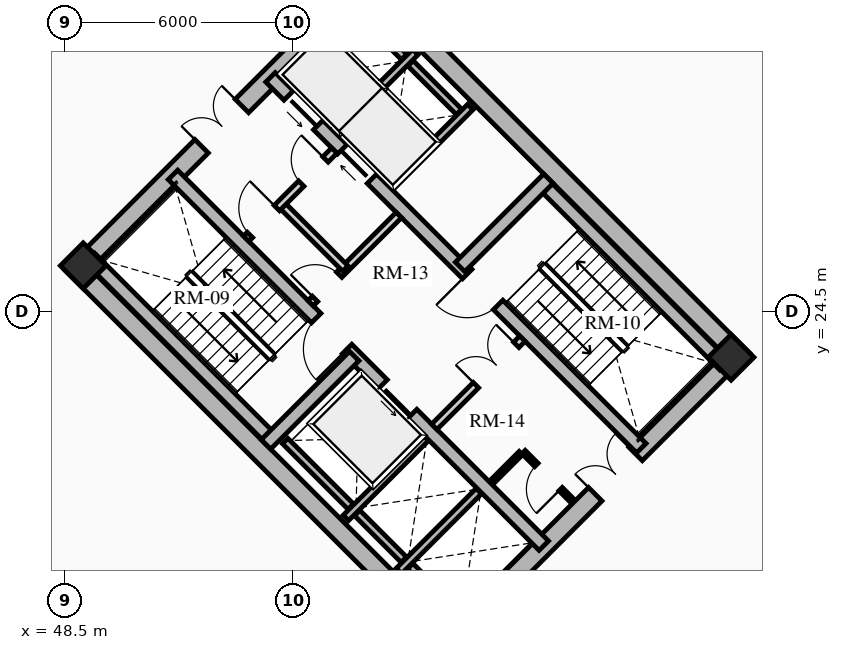
"""IFC4 building model, lengths in metres.
Left out: names, types, materials, properties, quantities, classifications, styles, units other than length and angle.
Written with IfcOpenShell. Run it as: python <this file> out.ifc"""

import sys

from ifc_helpers import new_model, si_unit, direction, frame, frame_2d, origin, origin_2d, place, context, subcontext, project, spatial, rectangle, extrude, source, transform, mapped, element, fill, save


model = new_model("IFC4")
c1 = context("Model", 3, precision=1e-05, world=origin(), true_north=direction((0.0, 1.0)))
c2 = subcontext(c1, "Body", "Model", "MODEL_VIEW")
j1 = project(units=[si_unit("LENGTHUNIT", "METRE"), si_unit("PLANEANGLEUNIT", "RADIAN")], contexts=[c1])
p1 = place(None, origin())
s1 = spatial("IfcSite", under=j1, at=p1, CompositionType="ELEMENT")
p2 = place(p1, origin())
s2 = spatial("IfcBuilding", under=s1, at=p2, CompositionType="ELEMENT")
p3 = place(p2, frame((0.0, 0.0, 4.8)))
s3 = spatial("IfcBuildingStorey", under=s2, at=p3, CompositionType="ELEMENT", Elevation=4.8)
for number, where, z_axis, x_axis in (
    (1, (58.773, 15.661, 0.0), (0.0, 0.0, 1.0), (-0.707, 0.707, 0.0)),
    (2, (66.339, 23.227, 0.0), (0.0, 0.0, 1.0), (-0.707, 0.707, 0.0)),
):
    element("IfcWall", number, at=place(p3, frame(where, z_axis=z_axis, x_axis=x_axis)), inside=s3, PredefinedType="SHEAR", context=c2, shape_type="SweptSolid", body=[
        extrude(rectangle(XDim=14.3, YDim=0.5, at=frame_2d((7.15, 0.0))), origin(), (0.0, 0.0, 1.0), 4.2),
    ])
p4 = place(p3, frame((58.596, 15.838, 0.0), z_axis=(0.0, 0.0, 1.0), x_axis=(0.707106781187, 0.707106781187, 0.0)))
e3 = element("IfcWall", 3, at=p4, inside=s3, PredefinedType="SHEAR", context=c2, shape_type="SweptSolid", body=[
    extrude(rectangle(XDim=10.7, YDim=0.5, at=frame_2d((5.35, 0.0))), origin(), (0.0, 0.0, 1.0), 4.2),
])
m1 = source(origin(), c2, "Body", "SweptSolid", [
    extrude(rectangle(XDim=1.5, YDim=2.02, at=frame_2d((0.75, 1.01))), frame((0.0, 0.26, 0.0), z_axis=(0.0, -1.0, 0.0), x_axis=(1.0, 0.0, 0.0)), (0.0, 0.0, 1.0), 0.52),
])
p5 = place(p4, frame((5.45, 0.0, 0.0)))
e4 = element("IfcOpeningElement", 4, at=p5, cuts=e3, PredefinedType="OPENING", context=c2, shape_type="MappedRepresentation", body=[
    mapped(m1, transform((0.0, 0.0, 0.0), x_axis=(1.0, 0.0, 0.0), y_axis=(0.0, 1.0, 0.0), z_axis=(0.0, 0.0, 1.0), scale=1.0)),
])
p6 = place(p3, frame((48.838, 25.596, 0.0), z_axis=(0.0, 0.0, 1.0), x_axis=(0.707106781187, 0.707106781187, 0.0)))
e5 = element("IfcWall", 5, at=p6, inside=s3, PredefinedType="SHEAR", context=c2, shape_type="SweptSolid", body=[
    extrude(rectangle(XDim=10.7, YDim=0.5, at=frame_2d((5.35, 0.0))), origin(), (0.0, 0.0, 1.0), 4.2),
])
p7 = place(p6, frame((4.6, 0.0, 0.0)))
e6 = element("IfcOpeningElement", 6, at=p7, cuts=e5, PredefinedType="OPENING", context=c2, shape_type="MappedRepresentation", body=[
    mapped(m1, transform((0.0, 0.0, 0.0), x_axis=(1.0, 0.0, 0.0), y_axis=(0.0, 1.0, 0.0), z_axis=(0.0, 0.0, 1.0), scale=1.0)),
])
p8 = place(p3, frame((61.096, 18.338, 0.0), z_axis=(0.0, 0.0, 1.0), x_axis=(-0.707106781187, 0.707106781187, 0.0)))
e7 = element("IfcWall", 7, at=p8, inside=s3, PredefinedType="SHEAR", context=c2, shape_type="SweptSolid", body=[
    extrude(rectangle(XDim=13.8, YDim=0.35, at=frame_2d((6.9, 0.0))), origin(), (0.0, 0.0, 1.0), 4.2),
])
m2 = source(origin(), c2, "Body", "SweptSolid", [
    extrude(rectangle(XDim=1.1, YDim=2.015, at=frame_2d((0.55, 1.007))), frame((0.0, 0.185, 0.0), z_axis=(0.0, -1.0, 0.0), x_axis=(1.0, 0.0, 0.0)), (0.0, 0.0, 1.0), 0.37),
])
p9 = place(p8, frame((4.9, 0.0, 0.0)))
e8 = element("IfcOpeningElement", 8, at=p9, cuts=e7, PredefinedType="OPENING", context=c2, shape_type="MappedRepresentation", body=[
    mapped(m2, transform((0.0, 0.0, 0.0), x_axis=(1.0, 0.0, 0.0), y_axis=(0.0, 1.0, 0.0), z_axis=(0.0, 0.0, 1.0), scale=1.0)),
])
m3 = source(origin(), c2, "Body", "SweptSolid", [
    extrude(rectangle(XDim=1.15, YDim=2.02, at=frame_2d((0.575, 1.01))), frame((0.0, 0.185, 0.0), z_axis=(0.0, -1.0, 0.0), x_axis=(1.0, 0.0, 0.0)), (0.0, 0.0, 1.0), 0.37),
])
p10 = place(p8, frame((7.32, 0.0, 0.0)))
e9 = element("IfcOpeningElement", 9, at=p10, cuts=e7, PredefinedType="OPENING", context=c2, shape_type="MappedRepresentation", body=[
    mapped(m3, transform((0.0, 0.0, 0.0), x_axis=(1.0, 0.0, 0.0), y_axis=(0.0, 1.0, 0.0), z_axis=(0.0, 0.0, 1.0), scale=1.0)),
])
p11 = place(p3, frame((63.662, 20.904, 0.0), z_axis=(0.0, 0.0, 1.0), x_axis=(-0.707106781187, 0.707106781187, 0.0)))
e10 = element("IfcWall", 10, at=p11, inside=s3, PredefinedType="SHEAR", context=c2, shape_type="SweptSolid", body=[
    extrude(rectangle(XDim=13.8, YDim=0.35, at=frame_2d((6.9, 0.0))), origin(), (0.0, 0.0, 1.0), 4.2),
])
p12 = place(p11, frame((10.025, 0.0, 0.0)))
e11 = element("IfcOpeningElement", 11, at=p12, cuts=e10, PredefinedType="OPENING", context=c2, shape_type="MappedRepresentation", body=[
    mapped(m2, transform((0.0, 0.0, 0.0), x_axis=(1.0, 0.0, 0.0), y_axis=(0.0, 1.0, 0.0), z_axis=(0.0, 0.0, 1.0), scale=1.0)),
])
p13 = place(p11, frame((12.025, 0.0, 0.0)))
e12 = element("IfcOpeningElement", 12, at=p13, cuts=e10, PredefinedType="OPENING", context=c2, shape_type="MappedRepresentation", body=[
    mapped(m2, transform((0.0, 0.0, 0.0), x_axis=(1.0, 0.0, 0.0), y_axis=(0.0, 1.0, 0.0), z_axis=(0.0, 0.0, 1.0), scale=1.0)),
])
p14 = place(p11, frame((5.33, 0.0, 0.0)))
e13 = element("IfcOpeningElement", 13, at=p14, cuts=e10, PredefinedType="OPENING", context=c2, shape_type="MappedRepresentation", body=[
    mapped(m3, transform((0.0, 0.0, 0.0), x_axis=(1.0, 0.0, 0.0), y_axis=(0.0, 1.0, 0.0), z_axis=(0.0, 0.0, 1.0), scale=1.0)),
])
p15 = place(p3, frame((53.922, 21.141, 0.0), z_axis=(0.0, 0.0, 1.0), x_axis=(-0.707106781187, 0.707106781187, 0.0)))
e14 = element("IfcWall", 14, at=p15, inside=s3, PredefinedType="SHEAR", context=c2, shape_type="SweptSolid", body=[
    extrude(rectangle(XDim=6.745, YDim=0.35, at=frame_2d((3.373, 0.0))), origin(), (0.0, 0.0, 1.0), 4.2),
])
p16 = place(p3, frame((53.784, 21.003, 0.0), z_axis=(0.0, 0.0, 1.0), x_axis=(0.707106781187, 0.707106781187, 0.0)))
e15 = element("IfcWall", 15, at=p16, inside=s3, PredefinedType="SHEAR", context=c2, shape_type="SweptSolid", body=[
    extrude(rectangle(XDim=3.285, YDim=0.35, at=frame_2d((1.643, 0.0))), origin(), (0.0, 0.0, 1.0), 4.2),
])
p17 = place(p3, frame((65.847, 23.089, 0.0), z_axis=(0.0, 0.0, 1.0), x_axis=(-0.707106781187, 0.707106781187, 0.0)))
e16 = element("IfcWall", 16, at=p17, inside=s3, PredefinedType="SHEAR", context=c2, shape_type="SweptSolid", body=[
    extrude(rectangle(XDim=6.745, YDim=0.35, at=frame_2d((3.373, 0.0))), origin(), (0.0, 0.0, 1.0), 4.2),
])
p18 = place(p3, frame((58.893, 25.674, 0.0), z_axis=(0.0, 0.0, 1.0), x_axis=(0.707106781187, 0.707106781187, 0.0)))
e17 = element("IfcWall", 17, at=p18, inside=s3, PredefinedType="SHEAR", context=c2, shape_type="SweptSolid", body=[
    extrude(rectangle(XDim=3.285, YDim=0.35, at=frame_2d((1.643, 0.0))), origin(), (0.0, 0.0, 1.0), 4.2),
])
for number, where, z_axis, x_axis in (
    (18, (48.976, 25.706, 0.0), (0.0, 0.0, 1.0), (0.707, 0.707, 0.0)),
    (19, (66.024, 23.294, 0.0), (0.0, 0.0, 1.0), (0.707, 0.707, 0.0)),
):
    element("IfcColumn", number, at=place(p3, frame(where, z_axis=z_axis, x_axis=x_axis)), inside=s3, PredefinedType="COLUMN", context=c2, shape_type="SweptSolid", body=[
        extrude(rectangle(XDim=0.85, YDim=0.85, at=origin_2d()), origin(), (0.0, 0.0, 1.0), 4.2),
    ])
p19 = place(p3, frame((55.888, 19.069, 0.0), z_axis=(0.0, 0.0, 1.0), x_axis=(0.707106781187, 0.707106781187, 0.0)))
e20 = element("IfcWall", 20, at=p19, inside=s3, PredefinedType="SHEAR", context=c2, shape_type="SweptSolid", body=[
    extrude(rectangle(XDim=2.97, YDim=0.2, at=frame_2d((1.485, 0.0))), origin(), (0.0, 0.0, 1.0), 4.2),
])
p20 = place(p3, frame((56.015, 19.366, 0.0), z_axis=(0.0, 0.0, 1.0), x_axis=(-0.707106781187, 0.707106781187, 0.0)))
e21 = element("IfcWall", 21, at=p20, inside=s3, PredefinedType="SHEAR", context=c2, shape_type="SweptSolid", body=[
    extrude(rectangle(XDim=2.44, YDim=0.2, at=frame_2d((1.22, 0.0))), origin(), (0.0, 0.0, 1.0), 4.2),
])
p21 = place(p3, frame((57.284, 17.673, 0.0), z_axis=(0.0, 0.0, 1.0), x_axis=(0.707147878904, 0.70706568108, 0.0)))
e22 = element("IfcWall", 22, at=p21, inside=s3, PredefinedType="SHEAR", context=c2, shape_type="SweptSolid", body=[
    extrude(rectangle(XDim=2.97, YDim=0.2, at=frame_2d((1.485, 0.0))), origin(), (0.0, 0.0, 1.0), 4.2),
])
p22 = place(p3, frame((57.412, 17.97, 0.0), z_axis=(0.0, 0.0, 1.0), x_axis=(-0.707106781187, 0.707106781187, 0.0)))
e23 = element("IfcWall", 23, at=p22, inside=s3, PredefinedType="SHEAR", context=c2, shape_type="SweptSolid", body=[
    extrude(rectangle(XDim=1.735, YDim=0.2, at=frame_2d((0.867, 0.0))), origin(), (0.0, 0.0, 1.0), 4.2),
])
p23 = place(p3, frame((58.737, 16.644, 0.0), z_axis=(0.0, 0.0, 1.0), x_axis=(-0.707032117043, 0.707181437447, 0.0)))
e24 = element("IfcWall", 24, at=p23, inside=s3, PredefinedType="SHEAR", context=c2, shape_type="SweptSolid", body=[
    extrude(rectangle(XDim=1.635, YDim=0.2, at=frame_2d((0.817, 0.0))), origin(), (0.0, 0.0, 1.0), 4.2),
])
p24 = place(p3, frame((57.062, 27.781, 0.0), z_axis=(0.0, 0.0, 1.0), x_axis=(0.707106781187, 0.707106781187, 0.0)))
e25 = element("IfcWall", 25, at=p24, inside=s3, PredefinedType="SHEAR", context=c2, shape_type="SweptSolid", body=[
    extrude(rectangle(XDim=2.97, YDim=0.2, at=frame_2d((1.485, 0.0))), origin(), (0.0, 0.0, 1.0), 4.2),
])
p25 = place(p3, frame((55.615, 29.227, 0.0), z_axis=(0.0, 0.0, 1.0), x_axis=(0.707147878904, 0.70706568108, 0.0)))
e26 = element("IfcWall", 26, at=p25, inside=s3, PredefinedType="SHEAR", context=c2, shape_type="SweptSolid", body=[
    extrude(rectangle(XDim=2.97, YDim=0.2, at=frame_2d((1.485, 0.0))), origin(), (0.0, 0.0, 1.0), 4.2),
])
p26 = place(p3, frame((58.865, 29.754, 0.0), z_axis=(0.0, 0.0, 1.0), x_axis=(-0.707174411312, 0.707039144592, 0.0)))
e27 = element("IfcWall", 27, at=p26, inside=s3, PredefinedType="SHEAR", context=c2, shape_type="SweptSolid", body=[
    extrude(rectangle(XDim=1.805, YDim=0.2, at=frame_2d((0.902, 0.0))), origin(), (0.0, 0.0, 1.0), 4.2),
])
p27 = place(p3, frame((57.419, 31.2, 0.0), z_axis=(0.0, 0.0, 1.0), x_axis=(-0.707032117043, 0.707181437447, 0.0)))
e28 = element("IfcWall", 28, at=p27, inside=s3, PredefinedType="SHEAR", context=c2, shape_type="SweptSolid", body=[
    extrude(rectangle(XDim=1.635, YDim=0.2, at=frame_2d((0.817, 0.0))), origin(), (0.0, 0.0, 1.0), 4.2),
])
p28 = place(p3, frame((58.214, 21.467, 0.0), z_axis=(0.0, 0.0, 1.0), x_axis=(0.707106781187, 0.707106781187, 0.0)))
e29 = element("IfcWall", 29, at=p28, inside=s3, PredefinedType="PARTITIONING", context=c2, shape_type="SweptSolid", body=[
    extrude(rectangle(XDim=3.28, YDim=0.2, at=frame_2d((1.64, 0.0))), origin(), (0.0, 0.0, 1.0), 3.885),
])
m4 = source(origin(), c2, "Body", "SweptSolid", [
    extrude(rectangle(XDim=1.5, YDim=2.02, at=frame_2d((0.75, 1.01))), frame((0.0, 0.11, 0.0), z_axis=(0.0, -1.0, 0.0), x_axis=(1.0, 0.0, 0.0)), (0.0, 0.0, 1.0), 0.22),
])
p29 = place(p28, frame((1.55, 0.0, 0.0)))
e30 = element("IfcOpeningElement", 30, at=p29, cuts=e29, PredefinedType="OPENING", context=c2, shape_type="MappedRepresentation", body=[
    mapped(m4, transform((0.0, 0.0, 0.0), x_axis=(1.0, 0.0, 0.0), y_axis=(0.0, 1.0, 0.0), z_axis=(0.0, 0.0, 1.0), scale=1.0)),
])
p30 = place(p3, frame((54.961, 24.719, 0.0), z_axis=(0.0, 0.0, 1.0), x_axis=(0.707106781187, 0.707106781187, 0.0)))
e31 = element("IfcWall", 31, at=p30, inside=s3, PredefinedType="PARTITIONING", context=c2, shape_type="SweptSolid", body=[
    extrude(rectangle(XDim=3.28, YDim=0.2, at=frame_2d((1.64, 0.0))), origin(), (0.0, 0.0, 1.0), 3.885),
])
m5 = source(origin(), c2, "Body", "SweptSolid", [
    extrude(rectangle(XDim=0.9, YDim=2.005, at=frame_2d((0.45, 1.002))), frame((0.0, 0.11, 0.0), z_axis=(0.0, -1.0, 0.0), x_axis=(1.0, 0.0, 0.0)), (0.0, 0.0, 1.0), 0.22),
])
p31 = place(p30, frame((0.16, 0.0, 0.0)))
e32 = element("IfcOpeningElement", 32, at=p31, cuts=e31, PredefinedType="OPENING", context=c2, shape_type="MappedRepresentation", body=[
    mapped(m5, transform((0.0, 0.0, 0.0), x_axis=(1.0, 0.0, 0.0), y_axis=(0.0, 1.0, 0.0), z_axis=(0.0, 0.0, 1.0), scale=1.0)),
])
p32 = place(p3, frame((55.874, 25.631, 0.0), z_axis=(0.0, 0.0, 1.0), x_axis=(-0.707157639372, 0.707055919343, 0.0)))
e33 = element("IfcWall", 33, at=p32, inside=s3, PredefinedType="PARTITIONING", context=c2, shape_type="SweptSolid", body=[
    extrude(rectangle(XDim=2.4, YDim=0.2, at=frame_2d((1.2, 0.0))), origin(), (0.0, 0.0, 1.0), 3.885),
])
p33 = place(p3, frame((53.264, 26.416, 0.0), z_axis=(0.0, 0.0, 1.0), x_axis=(0.707106781187, 0.707106781187, 0.0)))
e34 = element("IfcWall", 34, at=p33, inside=s3, PredefinedType="PARTITIONING", context=c2, shape_type="SweptSolid", body=[
    extrude(rectangle(XDim=3.28, YDim=0.2, at=frame_2d((1.64, 0.0))), origin(), (0.0, 0.0, 1.0), 3.885),
])
m6 = source(origin(), c2, "Body", "SweptSolid", [
    extrude(rectangle(XDim=1.0, YDim=2.015, at=frame_2d((0.5, 1.007))), frame((0.0, 0.11, 0.0), z_axis=(0.0, -1.0, 0.0), x_axis=(1.0, 0.0, 0.0)), (0.0, 0.0, 1.0), 0.22),
])
p34 = place(p33, frame((0.14, 0.0, 0.0)))
e35 = element("IfcOpeningElement", 35, at=p34, cuts=e34, PredefinedType="OPENING", context=c2, shape_type="MappedRepresentation", body=[
    mapped(m6, transform((0.0, 0.0, 0.0), x_axis=(1.0, 0.0, 0.0), y_axis=(0.0, 1.0, 0.0), z_axis=(0.0, 0.0, 1.0), scale=1.0)),
])
p35 = place(p33, frame((2.05, 0.0, 0.0)))
e36 = element("IfcOpeningElement", 36, at=p35, cuts=e34, PredefinedType="OPENING", context=c2, shape_type="MappedRepresentation", body=[
    mapped(m5, transform((0.0, 0.0, 0.0), x_axis=(1.0, 0.0, 0.0), y_axis=(0.0, 1.0, 0.0), z_axis=(0.0, 0.0, 1.0), scale=1.0)),
])
p36 = place(p3, frame((61.835, 19.529, 0.0), z_axis=(0.0, 0.0, 1.0), x_axis=(-0.707174592913, 0.707038962956, 0.0)))
e37 = element("IfcWall", 37, at=p36, inside=s3, PredefinedType="PARTITIONING", context=c2, shape_type="SweptSolid", body=[
    extrude(rectangle(XDim=1.8, YDim=0.125, at=frame_2d((0.9, 0.0))), origin(), (0.0, 0.0, 1.0), 3.885),
])
m7 = source(origin(), c2, "Body", "SweptSolid", [
    extrude(rectangle(XDim=0.9, YDim=2.005, at=frame_2d((0.45, 1.002))), frame((0.0, 0.073, 0.0), z_axis=(0.0, -1.0, 0.0), x_axis=(1.0, 0.0, 0.0)), (0.0, 0.0, 1.0), 0.145),
])
p37 = place(p36, frame((0.42, 0.0, 0.0)))
e38 = element("IfcOpeningElement", 38, at=p37, cuts=e37, PredefinedType="OPENING", context=c2, shape_type="MappedRepresentation", body=[
    mapped(m7, transform((0.0, 0.0, 0.0), x_axis=(1.0, 0.0, 0.0), y_axis=(0.0, 1.0, 0.0), z_axis=(0.0, 0.0, 1.0), scale=1.0)),
])
p38 = place(p3, frame((59.713, 19.996, 0.0), z_axis=(0.0, 0.0, 1.0), x_axis=(0.707217726, 0.706995818963, 0.0)))
e39 = element("IfcWall", 39, at=p38, inside=s3, PredefinedType="PARTITIONING", context=c2, shape_type="SweptSolid", body=[
    extrude(rectangle(XDim=1.1, YDim=0.125, at=frame_2d((0.55, 0.0))), origin(), (0.0, 0.0, 1.0), 3.885),
])
m8 = source(origin(), c2, "Body", "SweptSolid", [
    extrude(rectangle(XDim=1.1, YDim=2.015, at=frame_2d((0.55, 1.007))), frame((0.0, 0.025, 0.0), z_axis=(0.0, -1.0, 0.0), x_axis=(1.0, 0.0, 0.0)), (0.0, 0.0, 1.0), 0.05),
])
p39 = place(p9, origin())
e40 = element("IfcDoor", 40, at=p39, inside=s3, OperationType="SLIDING_TO_LEFT", PredefinedType="DOOR", context=c2, shape_type="MappedRepresentation", body=[
    mapped(m8, transform((0.0, 0.0, 0.0), x_axis=(1.0, 0.0, 0.0), y_axis=(0.0, 1.0, 0.0), z_axis=(0.0, 0.0, 1.0), scale=1.0)),
])
fill(e8, e40)
p40 = place(p12, origin())
e41 = element("IfcDoor", 41, at=p40, inside=s3, OperationType="SLIDING_TO_RIGHT", PredefinedType="DOOR", context=c2, shape_type="MappedRepresentation", body=[
    mapped(m8, transform((0.0, 0.0, 0.0), x_axis=(1.0, 0.0, 0.0), y_axis=(0.0, 1.0, 0.0), z_axis=(0.0, 0.0, 1.0), scale=1.0)),
])
fill(e11, e41)
p41 = place(p13, origin())
e42 = element("IfcDoor", 42, at=p41, inside=s3, OperationType="SLIDING_TO_LEFT", PredefinedType="DOOR", context=c2, shape_type="MappedRepresentation", body=[
    mapped(m8, transform((0.0, 0.0, 0.0), x_axis=(1.0, 0.0, 0.0), y_axis=(0.0, 1.0, 0.0), z_axis=(0.0, 0.0, 1.0), scale=1.0)),
])
fill(e12, e42)
m9 = source(origin(), c2, "Body", "SweptSolid", [
    extrude(rectangle(XDim=1.15, YDim=2.02, at=frame_2d((0.575, 1.01))), frame((0.0, 0.025, 0.0), z_axis=(0.0, -1.0, 0.0), x_axis=(1.0, 0.0, 0.0)), (0.0, 0.0, 1.0), 0.05),
])
p42 = place(p10, origin())
e43 = element("IfcDoor", 43, at=p42, inside=s3, OperationType="SINGLE_SWING_LEFT", PredefinedType="DOOR", context=c2, shape_type="MappedRepresentation", body=[
    mapped(m9, transform((0.0, 0.0, 0.0), x_axis=(1.0, 0.0, 0.0), y_axis=(0.0, 1.0, 0.0), z_axis=(0.0, 0.0, 1.0), scale=1.0)),
])
fill(e9, e43)
p43 = place(p14, origin())
e44 = element("IfcDoor", 44, at=p43, inside=s3, OperationType="SINGLE_SWING_RIGHT", PredefinedType="DOOR", context=c2, shape_type="MappedRepresentation", body=[
    mapped(m9, transform((0.0, 0.0, 0.0), x_axis=(1.0, 0.0, 0.0), y_axis=(0.0, 1.0, 0.0), z_axis=(0.0, 0.0, 1.0), scale=1.0)),
])
fill(e13, e44)
m10 = source(origin(), c2, "Body", "SweptSolid", [
    extrude(rectangle(XDim=1.5, YDim=2.02, at=frame_2d((0.75, 1.01))), frame((0.0, 0.025, 0.0), z_axis=(0.0, -1.0, 0.0), x_axis=(1.0, 0.0, 0.0)), (0.0, 0.0, 1.0), 0.05),
])
p44 = place(p7, origin())
e45 = element("IfcDoor", 45, at=p44, inside=s3, OperationType="DOUBLE_DOOR_SINGLE_SWING", PredefinedType="DOOR", context=c2, shape_type="MappedRepresentation", body=[
    mapped(m10, transform((0.0, 0.0, 0.0), x_axis=(1.0, 0.0, 0.0), y_axis=(0.0, 1.0, 0.0), z_axis=(0.0, 0.0, 1.0), scale=1.0)),
])
fill(e6, e45)
p45 = place(p5, origin())
e46 = element("IfcDoor", 46, at=p45, inside=s3, OperationType="DOUBLE_DOOR_SINGLE_SWING", PredefinedType="DOOR", context=c2, shape_type="MappedRepresentation", body=[
    mapped(m10, transform((0.0, 0.0, 0.0), x_axis=(1.0, 0.0, 0.0), y_axis=(0.0, 1.0, 0.0), z_axis=(0.0, 0.0, 1.0), scale=1.0)),
])
fill(e4, e46)
p46 = place(p29, origin())
e47 = element("IfcDoor", 47, at=p46, inside=s3, OperationType="DOUBLE_DOOR_SINGLE_SWING", PredefinedType="DOOR", context=c2, shape_type="MappedRepresentation", body=[
    mapped(m10, transform((0.0, 0.0, 0.0), x_axis=(1.0, 0.0, 0.0), y_axis=(0.0, 1.0, 0.0), z_axis=(0.0, 0.0, 1.0), scale=1.0)),
])
fill(e30, e47)
m11 = source(origin(), c2, "Body", "SweptSolid", [
    extrude(rectangle(XDim=0.9, YDim=2.005, at=frame_2d((0.45, 1.002))), frame((0.0, 0.025, 0.0), z_axis=(0.0, -1.0, 0.0), x_axis=(1.0, 0.0, 0.0)), (0.0, 0.0, 1.0), 0.05),
])
p47 = place(p31, origin())
e48 = element("IfcDoor", 48, at=p47, inside=s3, OperationType="SINGLE_SWING_LEFT", PredefinedType="DOOR", context=c2, shape_type="MappedRepresentation", body=[
    mapped(m11, transform((0.0, 0.0, 0.0), x_axis=(1.0, 0.0, 0.0), y_axis=(0.0, 1.0, 0.0), z_axis=(0.0, 0.0, 1.0), scale=1.0)),
])
fill(e32, e48)
m12 = source(origin(), c2, "Body", "SweptSolid", [
    extrude(rectangle(XDim=1.0, YDim=2.015, at=frame_2d((0.5, 1.007))), frame((0.0, 0.025, 0.0), z_axis=(0.0, -1.0, 0.0), x_axis=(1.0, 0.0, 0.0)), (0.0, 0.0, 1.0), 0.05),
])
p48 = place(p34, origin())
e49 = element("IfcDoor", 49, at=p48, inside=s3, OperationType="SINGLE_SWING_RIGHT", PredefinedType="DOOR", context=c2, shape_type="MappedRepresentation", body=[
    mapped(m12, transform((0.0, 0.0, 0.0), x_axis=(1.0, 0.0, 0.0), y_axis=(0.0, 1.0, 0.0), z_axis=(0.0, 0.0, 1.0), scale=1.0)),
])
fill(e35, e49)
p49 = place(p37, origin())
e50 = element("IfcDoor", 50, at=p49, inside=s3, OperationType="SINGLE_SWING_LEFT", PredefinedType="DOOR", context=c2, shape_type="MappedRepresentation", body=[
    mapped(m11, transform((0.0, 0.0, 0.0), x_axis=(1.0, 0.0, 0.0), y_axis=(0.0, 1.0, 0.0), z_axis=(0.0, 0.0, 1.0), scale=1.0)),
])
fill(e38, e50)
p50 = place(p35, origin())
e51 = element("IfcDoor", 51, at=p50, inside=s3, OperationType="SINGLE_SWING_RIGHT", PredefinedType="DOOR", context=c2, shape_type="MappedRepresentation", body=[
    mapped(m11, transform((0.0, 0.0, 0.0), x_axis=(1.0, 0.0, 0.0), y_axis=(0.0, 1.0, 0.0), z_axis=(0.0, 0.0, 1.0), scale=1.0)),
])
fill(e36, e51)
save(model, sys.argv[1])
